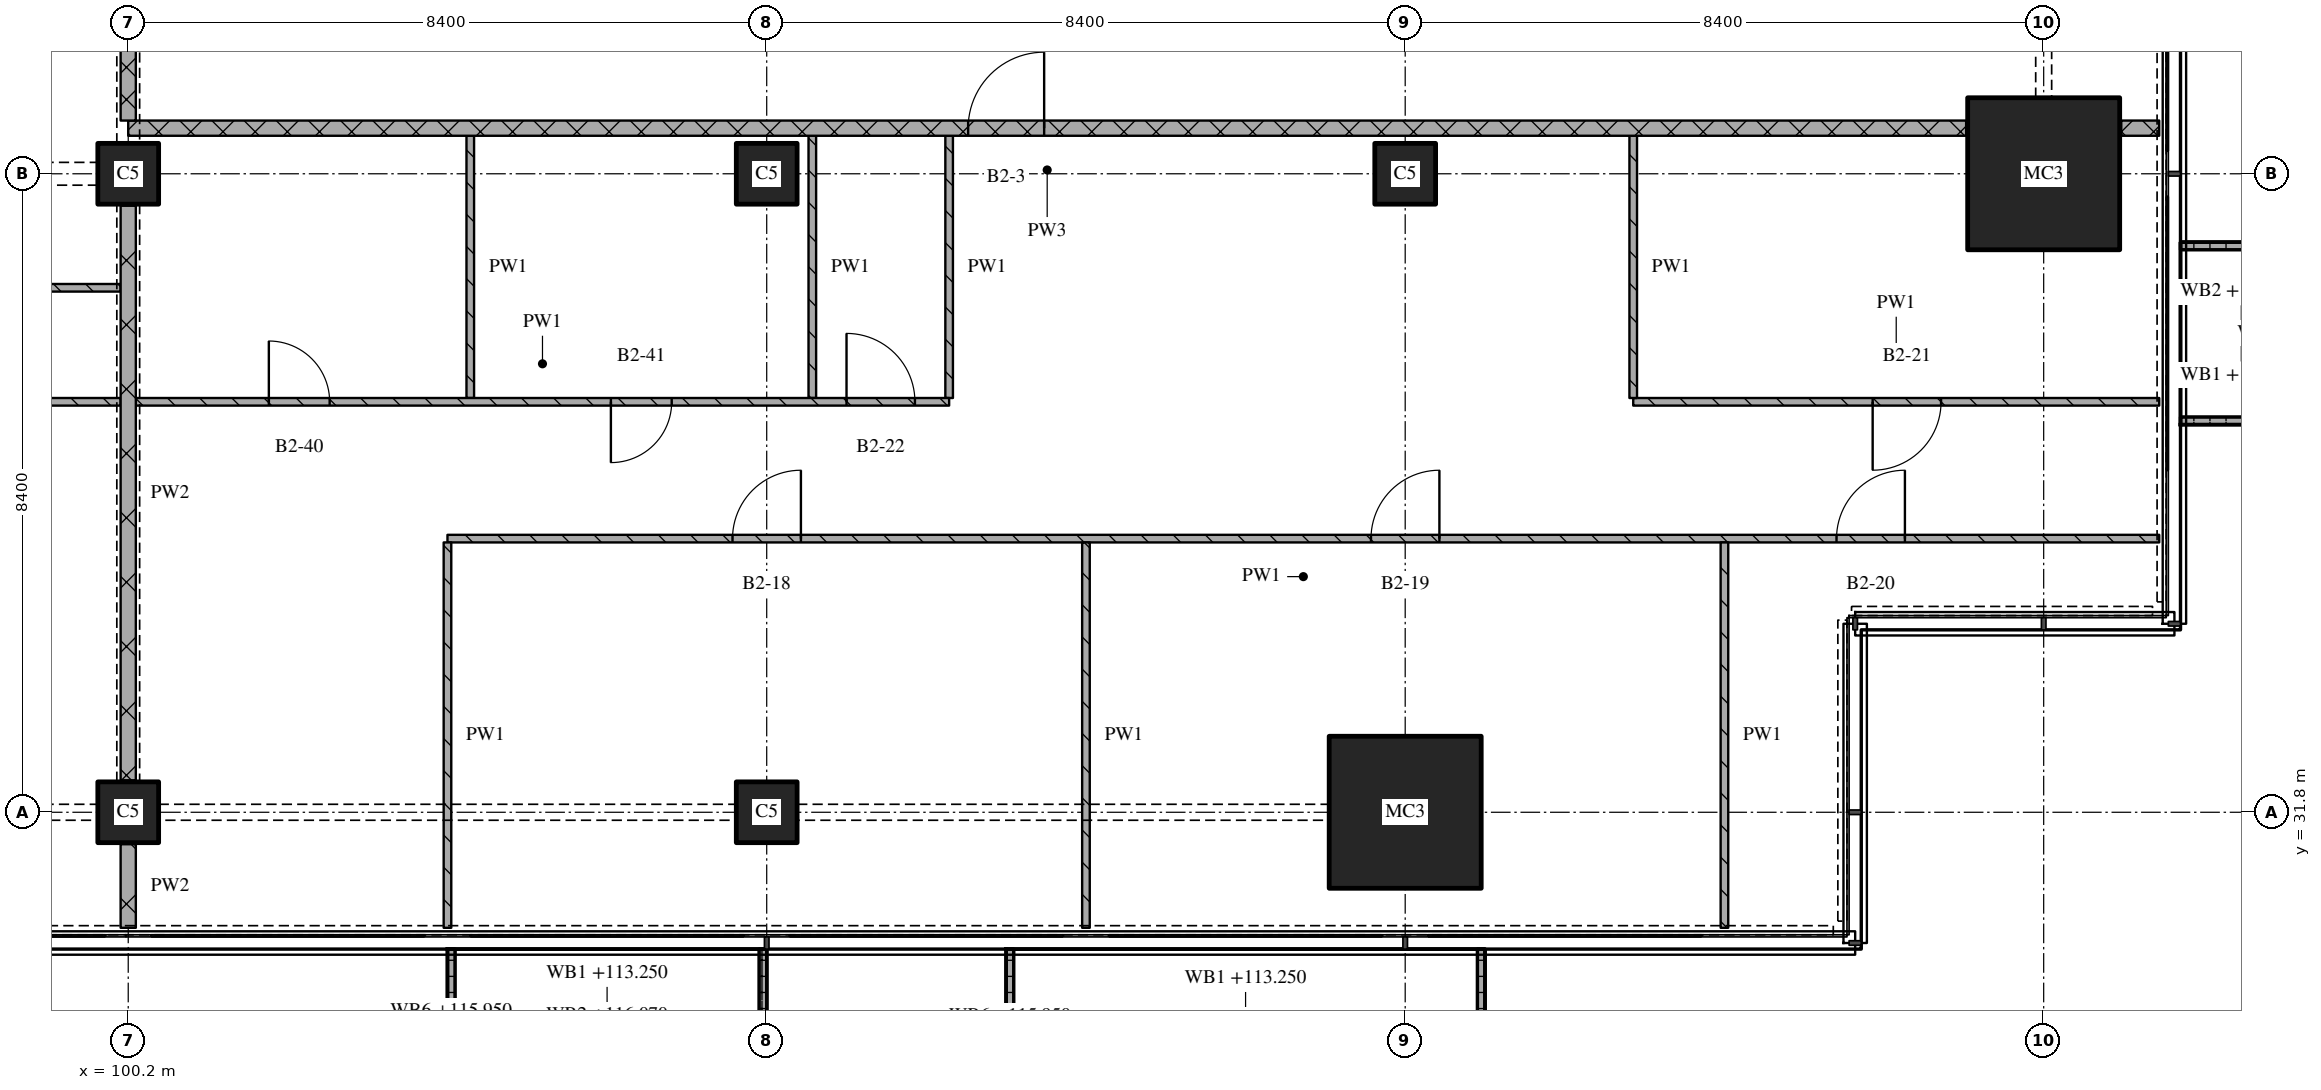
"""IFC4 building model, lengths in metres.
Left out: names, types, materials, properties, quantities, classifications, styles, units other than length and angle.
Written with IfcOpenShell. Run it as: python <this file> out.ifc"""

import sys

from ifc_helpers import new_model, si_unit, direction, frame, frame_2d, origin, origin_2d, place, context, subcontext, project, spatial, polyline, rectangle, outline, extrude, element, fill, save


model = new_model("IFC4")
c1 = context("Model", 3, precision=1e-05, world=origin(), true_north=direction((0.0, 1.0)))
c2 = subcontext(c1, "Body", "Model", "MODEL_VIEW")
j1 = project(units=[si_unit("LENGTHUNIT", "METRE"), si_unit("PLANEANGLEUNIT", "RADIAN")], contexts=[c1])
p1 = place(None, origin())
s1 = spatial("IfcSite", under=j1, at=p1, CompositionType="ELEMENT")
p2 = place(p1, origin())
s2 = spatial("IfcBuilding", under=s1, at=p2, CompositionType="ELEMENT")
p3 = place(p2, frame((0.0, 0.0, 113.25)))
s3 = spatial("IfcBuildingStorey", under=s2, at=p3, CompositionType="ELEMENT", Elevation=113.25)
for number, where, z_axis, x_axis in (
    (1, (100.2, 31.8, 0.0), (0.0, 0.0, 1.0), (1.0, 0.0, 0.0)),
    (2, (100.2, 40.2, 0.0), (0.0, 0.0, 1.0), (1.0, 0.0, 0.0)),
    (3, (108.6, 31.8, 0.0), (0.0, 0.0, 1.0), (1.0, 0.0, 0.0)),
    (4, (108.6, 40.2, 0.0), (0.0, 0.0, 1.0), (1.0, 0.0, 0.0)),
):
    element("IfcColumn", number, at=place(p3, frame(where, z_axis=z_axis, x_axis=x_axis)), inside=s3, PredefinedType="COLUMN", context=c2, shape_type="SweptSolid", body=[
        extrude(rectangle(XDim=0.8, YDim=0.8, at=origin_2d()), origin(), (0.0, 0.0, 1.0), 3.6),
    ])
p4 = place(p3, frame((117.0, 31.8, 0.0), z_axis=(0.0, 0.0, 1.0), x_axis=(1.0, 0.0, 0.0)))
e5 = element("IfcColumn", 5, at=p4, inside=s3, PredefinedType="COLUMN", context=c2, shape_type="SweptSolid", body=[
    extrude(rectangle(XDim=2.0, YDim=2.0, at=origin_2d()), origin(), (0.0, 0.0, 1.0), 3.6),
])
p5 = place(p3, frame((117.0, 40.2, 0.0), z_axis=(0.0, 0.0, 1.0), x_axis=(1.0, 0.0, 0.0)))
e6 = element("IfcColumn", 6, at=p5, inside=s3, PredefinedType="COLUMN", context=c2, shape_type="SweptSolid", body=[
    extrude(rectangle(XDim=0.8, YDim=0.8, at=origin_2d()), origin(), (0.0, 0.0, 1.0), 3.6),
])
p6 = place(p3, frame((125.4, 40.2, 0.0), z_axis=(0.0, 0.0, 1.0), x_axis=(1.0, 0.0, 0.0)))
e7 = element("IfcColumn", 7, at=p6, inside=s3, PredefinedType="COLUMN", context=c2, shape_type="SweptSolid", body=[
    extrude(rectangle(XDim=2.0, YDim=2.0, at=origin_2d()), origin(), (0.0, 0.0, 1.0), 3.6),
])
p7 = place(p3, origin())
e8 = element("IfcWall", 8, at=p7, inside=s3, PredefinedType="SOLIDWALL", context=c2, shape_type="SweptSolid", body=[
    extrude(outline(polyline([(104.4, 30.0), (104.5, 30.0), (104.5, 28.367), (108.5, 28.367), (108.5, 30.0), (108.6, 30.0), (108.6, 28.267), (104.4, 28.267), (104.4, 30.0)])), origin(), (0.0, 0.0, 1.0), 1.0),
])
p8 = place(p3, origin())
e9 = element("IfcWall", 9, at=p8, inside=s3, PredefinedType="SOLIDWALL", context=c2, shape_type="SweptSolid", body=[
    extrude(outline(polyline([(111.75, 30.0), (111.85, 30.0), (111.85, 28.233), (117.95, 28.233), (117.95, 30.0), (118.05, 30.0), (118.05, 28.133), (111.75, 28.133), (111.75, 30.0)])), origin(), (0.0, 0.0, 1.0), 1.0),
])
p9 = place(p3, origin())
e10 = element("IfcWall", 10, at=p9, inside=s3, PredefinedType="SOLIDWALL", context=c2, shape_type="SweptSolid", body=[
    extrude(outline(polyline([(127.2, 36.9), (127.2, 37.0), (128.7, 37.0), (128.7, 39.2), (127.2, 39.2), (127.2, 39.3), (128.8, 39.3), (128.8, 36.9), (127.2, 36.9)])), origin(), (0.0, 0.0, 1.0), 1.0),
])
p10 = place(p3, frame((126.92, 35.4, 0.0), z_axis=(0.0, 0.0, 1.0), x_axis=(-1.0, 0.0, 0.0)))
e11 = element("IfcWall", 11, at=p10, inside=s3, PredefinedType="PARTITIONING", context=c2, shape_type="SweptSolid", body=[
    extrude(rectangle(XDim=22.52, YDim=0.1, at=frame_2d((11.26, 0.0))), origin(), (0.0, 0.0, 1.0), 3.32),
])
p11 = place(p10, frame((3.346, 0.0, 0.0)))
e12 = element("IfcOpeningElement", 12, at=p11, cuts=e11, PredefinedType="OPENING", context=c2, shape_type="SweptSolid", body=[
    extrude(rectangle(XDim=0.9, YDim=2.1, at=frame_2d((0.45, 1.05))), frame((0.0, 0.06, 0.0), z_axis=(0.0, -1.0, 0.0), x_axis=(1.0, 0.0, 0.0)), (0.0, 0.0, 1.0), 0.12),
])
p12 = place(p10, frame((9.47, 0.0, 0.0)))
e13 = element("IfcOpeningElement", 13, at=p12, cuts=e11, PredefinedType="OPENING", context=c2, shape_type="SweptSolid", body=[
    extrude(rectangle(XDim=0.9, YDim=2.1, at=frame_2d((0.45, 1.05))), frame((0.0, 0.06, 0.0), z_axis=(0.0, -1.0, 0.0), x_axis=(1.0, 0.0, 0.0)), (0.0, 0.0, 1.0), 0.12),
])
p13 = place(p10, frame((17.87, 0.0, 0.0)))
e14 = element("IfcOpeningElement", 14, at=p13, cuts=e11, PredefinedType="OPENING", context=c2, shape_type="SweptSolid", body=[
    extrude(rectangle(XDim=0.9, YDim=2.1, at=frame_2d((0.45, 1.05))), frame((0.0, 0.06, 0.0), z_axis=(0.0, -1.0, 0.0), x_axis=(1.0, 0.0, 0.0)), (0.0, 0.0, 1.0), 0.12),
])
p14 = place(p3, frame((120.0, 37.2, 0.0), z_axis=(0.0, 0.0, 1.0), x_axis=(1.0, 0.0, 0.0)))
e15 = element("IfcWall", 15, at=p14, inside=s3, PredefinedType="PARTITIONING", context=c2, shape_type="SweptSolid", body=[
    extrude(rectangle(XDim=6.92, YDim=0.1, at=frame_2d((3.46, 0.0))), origin(), (0.0, 0.0, 1.0), 3.32),
])
p15 = place(p14, frame((3.15, 0.0, 0.0)))
e16 = element("IfcOpeningElement", 16, at=p15, cuts=e15, PredefinedType="OPENING", context=c2, shape_type="SweptSolid", body=[
    extrude(rectangle(XDim=0.9, YDim=2.1, at=frame_2d((0.45, 1.05))), frame((0.0, 0.06, 0.0), z_axis=(0.0, -1.0, 0.0), x_axis=(1.0, 0.0, 0.0)), (0.0, 0.0, 1.0), 0.12),
])
p16 = place(p3, frame((95.1, 38.7, 0.0), z_axis=(0.0, 0.0, 1.0), x_axis=(1.0, 0.0, 0.0)))
e17 = element("IfcWall", 17, at=p16, inside=s3, PredefinedType="PARTITIONING", context=c2, shape_type="SweptSolid", body=[
    extrude(rectangle(XDim=5.0, YDim=0.1, at=frame_2d((2.5, 0.0))), origin(), (0.0, 0.0, 1.0), 3.32),
])
p17 = place(p16, frame((2.1, 0.0, 0.0)))
e18 = element("IfcOpeningElement", 18, at=p17, cuts=e17, PredefinedType="OPENING", context=c2, shape_type="SweptSolid", body=[
    extrude(rectangle(XDim=0.9, YDim=2.1, at=frame_2d((0.45, 1.05))), frame((0.0, 0.06, 0.0), z_axis=(0.0, -1.0, 0.0), x_axis=(1.0, 0.0, 0.0)), (0.0, 0.0, 1.0), 0.12),
])
p18 = place(p3, frame((124.38, 40.8, 0.0), z_axis=(0.0, 0.0, 1.0), x_axis=(-1.0, 0.0, 0.0)))
e19 = element("IfcWall", 19, at=p18, inside=s3, PredefinedType="PARTITIONING", context=c2, shape_type="SweptSolid", body=[
    extrude(rectangle(XDim=24.18, YDim=0.2, at=frame_2d((12.09, 0.0))), origin(), (0.0, 0.0, 1.0), 3.32),
])
p19 = place(p18, frame((12.13, 0.0, 0.0)))
e20 = element("IfcOpeningElement", 20, at=p19, cuts=e19, PredefinedType="OPENING", context=c2, shape_type="SweptSolid", body=[
    extrude(rectangle(XDim=1.0, YDim=2.1, at=frame_2d((0.5, 1.05))), frame((0.0, 0.11, 0.0), z_axis=(0.0, -1.0, 0.0), x_axis=(1.0, 0.0, 0.0)), (0.0, 0.0, 1.0), 0.22),
])
p20 = place(p3, frame((126.42, 40.8, 0.0), z_axis=(0.0, 0.0, 1.0), x_axis=(1.0, 0.0, 0.0)))
e21 = element("IfcWall", 21, at=p20, inside=s3, PredefinedType="PARTITIONING", context=c2, shape_type="SweptSolid", body=[
    extrude(rectangle(XDim=0.5, YDim=0.2, at=frame_2d((0.25, 0.0))), origin(), (0.0, 0.0, 1.0), 3.32),
])
p21 = place(p3, frame((100.2, 43.1, 0.0), z_axis=(0.0, 0.0, 1.0), x_axis=(0.0, -1.0, 0.0)))
e22 = element("IfcWall", 22, at=p21, inside=s3, PredefinedType="PARTITIONING", context=c2, shape_type="SweptSolid", body=[
    extrude(rectangle(XDim=2.2, YDim=0.2, at=frame_2d((1.1, 0.0))), origin(), (0.0, 0.0, 1.0), 2.43),
])
p22 = place(p3, frame((100.2, 31.38, 0.0), z_axis=(0.0, 0.0, 1.0), x_axis=(0.0, -1.0, 0.0)))
e23 = element("IfcWall", 23, at=p22, inside=s3, PredefinedType="PARTITIONING", context=c2, shape_type="SweptSolid", body=[
    extrude(rectangle(XDim=1.1, YDim=0.2, at=frame_2d((0.55, 0.0))), origin(), (0.0, 0.0, 1.0), 3.32),
])
p23 = place(p3, frame((100.2, 39.78, 0.0), z_axis=(0.0, 0.0, 1.0), x_axis=(0.0, -1.0, 0.0)))
e24 = element("IfcWall", 24, at=p23, inside=s3, PredefinedType="PARTITIONING", context=c2, shape_type="SweptSolid", body=[
    extrude(rectangle(XDim=7.56, YDim=0.2, at=frame_2d((3.78, 0.0))), origin(), (0.0, 0.0, 1.0), 2.83),
])
p24 = place(p3, frame((104.4, 35.35, 0.0), z_axis=(0.0, 0.0, 1.0), x_axis=(0.0, -1.0, 0.0)))
e25 = element("IfcWall", 25, at=p24, inside=s3, PredefinedType="PARTITIONING", context=c2, shape_type="SweptSolid", body=[
    extrude(rectangle(XDim=5.07, YDim=0.1, at=frame_2d((2.535, 0.0))), origin(), (0.0, 0.0, 1.0), 3.32),
])
for number, where, z_axis, x_axis in (
    (26, (104.7, 40.7, 0.0), (0.0, 0.0, 1.0), (0.0, -1.0, 0.0)),
    (27, (109.2, 40.7, 0.0), (0.0, 0.0, 1.0), (0.0, -1.0, 0.0)),
    (28, (111.0, 40.7, 0.0), (0.0, 0.0, 1.0), (0.0, -1.0, 0.0)),
):
    element("IfcWall", number, at=place(p3, frame(where, z_axis=z_axis, x_axis=x_axis)), inside=s3, PredefinedType="PARTITIONING", context=c2, shape_type="SweptSolid", body=[
        extrude(rectangle(XDim=3.45, YDim=0.1, at=frame_2d((1.725, 0.0))), origin(), (0.0, 0.0, 1.0), 3.32),
    ])
p25 = place(p3, frame((112.8, 35.35, 0.0), z_axis=(0.0, 0.0, 1.0), x_axis=(0.0, -1.0, 0.0)))
e29 = element("IfcWall", 29, at=p25, inside=s3, PredefinedType="PARTITIONING", context=c2, shape_type="SweptSolid", body=[
    extrude(rectangle(XDim=5.07, YDim=0.1, at=frame_2d((2.535, 0.0))), origin(), (0.0, 0.0, 1.0), 3.32),
])
p26 = place(p3, frame((120.0, 40.7, 0.0), z_axis=(0.0, 0.0, 1.0), x_axis=(0.0, -1.0, 0.0)))
e30 = element("IfcWall", 30, at=p26, inside=s3, PredefinedType="PARTITIONING", context=c2, shape_type="SweptSolid", body=[
    extrude(rectangle(XDim=3.45, YDim=0.1, at=frame_2d((1.725, 0.0))), origin(), (0.0, 0.0, 1.0), 3.32),
])
p27 = place(p3, frame((121.2, 35.35, 0.0), z_axis=(0.0, 0.0, 1.0), x_axis=(0.0, -1.0, 0.0)))
e31 = element("IfcWall", 31, at=p27, inside=s3, PredefinedType="PARTITIONING", context=c2, shape_type="SweptSolid", body=[
    extrude(rectangle(XDim=5.07, YDim=0.1, at=frame_2d((2.535, 0.0))), origin(), (0.0, 0.0, 1.0), 3.32),
])
p28 = place(p3, frame((100.1, 37.2, 0.0), z_axis=(0.0, 0.0, 1.0), x_axis=(-1.0, 0.0, 0.0)))
e32 = element("IfcWall", 32, at=p28, inside=s3, PredefinedType="PARTITIONING", context=c2, shape_type="SweptSolid", body=[
    extrude(rectangle(XDim=12.5, YDim=0.1, at=frame_2d((6.25, 0.0))), origin(), (0.0, 0.0, 1.0), 3.32),
])
p29 = place(p28, frame((1.55, 0.0, 0.0)))
e33 = element("IfcOpeningElement", 33, at=p29, cuts=e32, PredefinedType="OPENING", context=c2, shape_type="SweptSolid", body=[
    extrude(rectangle(XDim=0.9, YDim=2.1, at=frame_2d((0.45, 1.05))), frame((0.0, 0.06, 0.0), z_axis=(0.0, -1.0, 0.0), x_axis=(1.0, 0.0, 0.0)), (0.0, 0.0, 1.0), 0.12),
])
p30 = place(p28, frame((7.85, 0.0, 0.0)))
e34 = element("IfcOpeningElement", 34, at=p30, cuts=e32, PredefinedType="OPENING", context=c2, shape_type="SweptSolid", body=[
    extrude(rectangle(XDim=0.9, YDim=2.1, at=frame_2d((0.45, 1.05))), frame((0.0, 0.06, 0.0), z_axis=(0.0, -1.0, 0.0), x_axis=(1.0, 0.0, 0.0)), (0.0, 0.0, 1.0), 0.12),
])
p31 = place(p3, frame((100.3, 37.2, 0.0), z_axis=(0.0, 0.0, 1.0), x_axis=(1.0, 0.0, 0.0)))
e35 = element("IfcWall", 35, at=p31, inside=s3, PredefinedType="PARTITIONING", context=c2, shape_type="SweptSolid", body=[
    extrude(rectangle(XDim=10.7, YDim=0.1, at=frame_2d((5.35, 0.0))), origin(), (0.0, 0.0, 1.0), 3.32),
])
p32 = place(p31, frame((1.75, 0.0, 0.0)))
e36 = element("IfcOpeningElement", 36, at=p32, cuts=e35, PredefinedType="OPENING", context=c2, shape_type="SweptSolid", body=[
    extrude(rectangle(XDim=0.8, YDim=2.1, at=frame_2d((0.4, 1.05))), frame((0.0, 0.06, 0.0), z_axis=(0.0, -1.0, 0.0), x_axis=(1.0, 0.0, 0.0)), (0.0, 0.0, 1.0), 0.12),
])
p33 = place(p31, frame((6.25, 0.0, 0.0)))
e37 = element("IfcOpeningElement", 37, at=p33, cuts=e35, PredefinedType="OPENING", context=c2, shape_type="SweptSolid", body=[
    extrude(rectangle(XDim=0.8, YDim=2.1, at=frame_2d((0.4, 1.05))), frame((0.0, 0.06, 0.0), z_axis=(0.0, -1.0, 0.0), x_axis=(1.0, 0.0, 0.0)), (0.0, 0.0, 1.0), 0.12),
])
p34 = place(p31, frame((9.35, 0.0, 0.0)))
e38 = element("IfcOpeningElement", 38, at=p34, cuts=e35, PredefinedType="OPENING", context=c2, shape_type="SweptSolid", body=[
    extrude(rectangle(XDim=0.9, YDim=2.1, at=frame_2d((0.45, 1.05))), frame((0.0, 0.06, 0.0), z_axis=(0.0, -1.0, 0.0), x_axis=(1.0, 0.0, 0.0)), (0.0, 0.0, 1.0), 0.12),
])
p35 = place(p11, origin())
e39 = element("IfcDoor", 39, at=p35, inside=s3, OperationType="SINGLE_SWING_RIGHT", PredefinedType="DOOR", context=c2, shape_type="SweptSolid", body=[
    extrude(rectangle(XDim=0.9, YDim=2.1, at=frame_2d((0.45, 1.05))), frame((0.0, 0.025, 0.0), z_axis=(0.0, -1.0, 0.0), x_axis=(1.0, 0.0, 0.0)), (0.0, 0.0, 1.0), 0.05),
])
fill(e12, e39)
p36 = place(p12, origin())
e40 = element("IfcDoor", 40, at=p36, inside=s3, OperationType="SINGLE_SWING_RIGHT", PredefinedType="DOOR", context=c2, shape_type="SweptSolid", body=[
    extrude(rectangle(XDim=0.9, YDim=2.1, at=frame_2d((0.45, 1.05))), frame((0.0, 0.025, 0.0), z_axis=(0.0, -1.0, 0.0), x_axis=(1.0, 0.0, 0.0)), (0.0, 0.0, 1.0), 0.05),
])
fill(e13, e40)
p37 = place(p13, origin())
e41 = element("IfcDoor", 41, at=p37, inside=s3, OperationType="SINGLE_SWING_RIGHT", PredefinedType="DOOR", context=c2, shape_type="SweptSolid", body=[
    extrude(rectangle(XDim=0.9, YDim=2.1, at=frame_2d((0.45, 1.05))), frame((0.0, 0.025, 0.0), z_axis=(0.0, -1.0, 0.0), x_axis=(1.0, 0.0, 0.0)), (0.0, 0.0, 1.0), 0.05),
])
fill(e14, e41)
p38 = place(p15, origin())
e42 = element("IfcDoor", 42, at=p38, inside=s3, OperationType="SINGLE_SWING_RIGHT", PredefinedType="DOOR", context=c2, shape_type="SweptSolid", body=[
    extrude(rectangle(XDim=0.9, YDim=2.1, at=frame_2d((0.45, 1.05))), frame((0.0, 0.025, 0.0), z_axis=(0.0, -1.0, 0.0), x_axis=(1.0, 0.0, 0.0)), (0.0, 0.0, 1.0), 0.05),
])
fill(e16, e42)
p39 = place(p19, origin())
e43 = element("IfcDoor", 43, at=p39, inside=s3, OperationType="SINGLE_SWING_RIGHT", PredefinedType="DOOR", context=c2, shape_type="SweptSolid", body=[
    extrude(rectangle(XDim=1.0, YDim=2.1, at=frame_2d((0.5, 1.05))), frame((0.0, 0.025, 0.0), z_axis=(0.0, -1.0, 0.0), x_axis=(1.0, 0.0, 0.0)), (0.0, 0.0, 1.0), 0.05),
])
fill(e20, e43)
p40 = place(p32, origin())
e44 = element("IfcDoor", 44, at=p40, inside=s3, OperationType="SINGLE_SWING_LEFT", PredefinedType="DOOR", context=c2, shape_type="SweptSolid", body=[
    extrude(rectangle(XDim=0.8, YDim=2.1, at=frame_2d((0.4, 1.05))), frame((0.0, 0.025, 0.0), z_axis=(0.0, -1.0, 0.0), x_axis=(1.0, 0.0, 0.0)), (0.0, 0.0, 1.0), 0.05),
])
fill(e36, e44)
p41 = place(p33, origin())
e45 = element("IfcDoor", 45, at=p41, inside=s3, OperationType="SINGLE_SWING_RIGHT", PredefinedType="DOOR", context=c2, shape_type="SweptSolid", body=[
    extrude(rectangle(XDim=0.8, YDim=2.1, at=frame_2d((0.4, 1.05))), frame((0.0, 0.025, 0.0), z_axis=(0.0, -1.0, 0.0), x_axis=(1.0, 0.0, 0.0)), (0.0, 0.0, 1.0), 0.05),
])
fill(e37, e45)
p42 = place(p34, origin())
e46 = element("IfcDoor", 46, at=p42, inside=s3, OperationType="SINGLE_SWING_LEFT", PredefinedType="DOOR", context=c2, shape_type="SweptSolid", body=[
    extrude(rectangle(XDim=0.9, YDim=2.1, at=frame_2d((0.45, 1.05))), frame((0.0, 0.025, 0.0), z_axis=(0.0, -1.0, 0.0), x_axis=(1.0, 0.0, 0.0)), (0.0, 0.0, 1.0), 0.05),
])
fill(e38, e46)
save(model, sys.argv[1])
